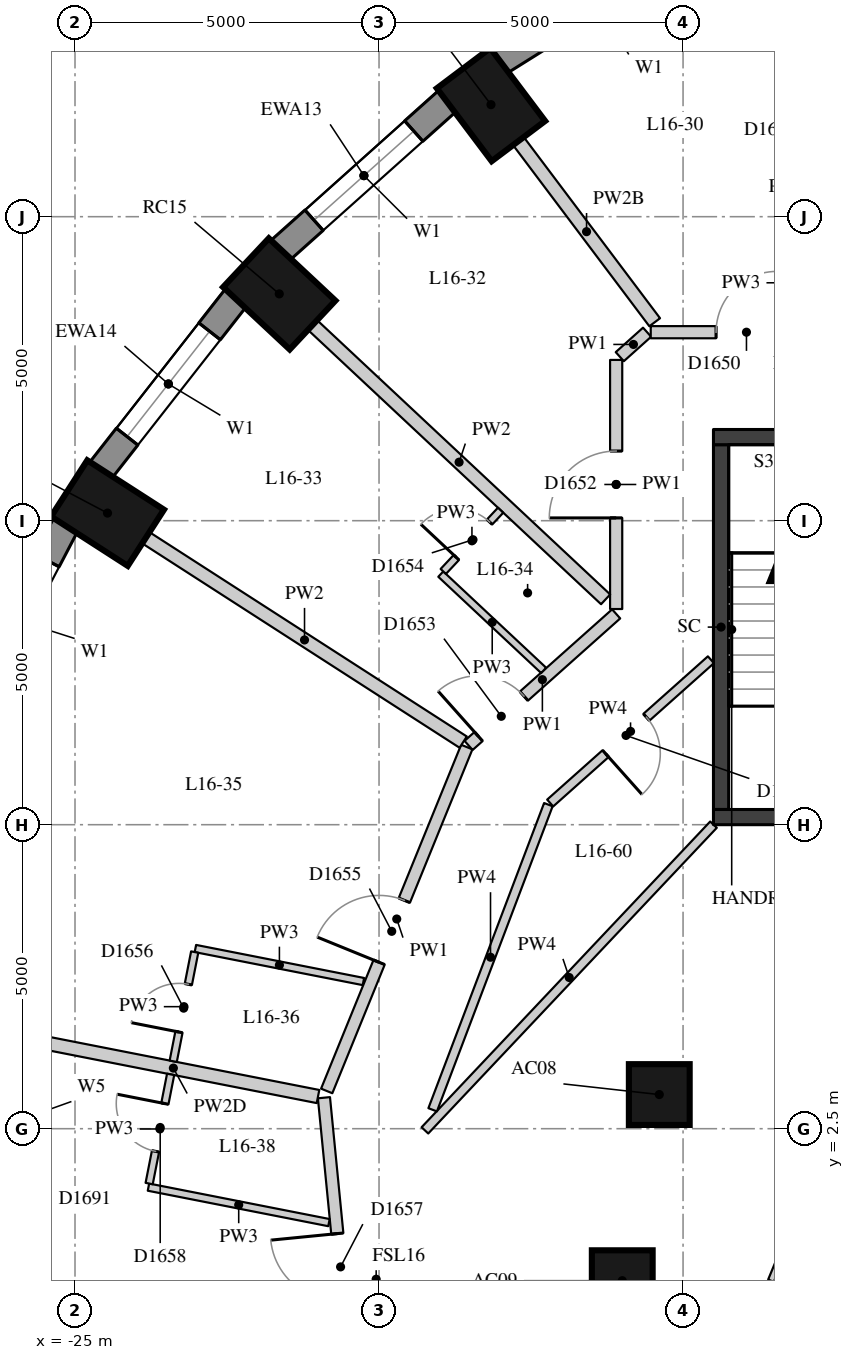
"""IFC4 building model, lengths in metres.
Left out: names, types, materials, properties, quantities, classifications, styles, units other than length and angle.
Written with IfcOpenShell. Run it as: python <this file> out.ifc"""

import sys

from ifc_helpers import new_model, si_unit, direction, frame, frame_2d, origin, origin_2d, place, context, subcontext, project, spatial, rectangle, extrude, element, fill, save


model = new_model("IFC4")
c1 = context("Model", 3, precision=1e-05, world=origin(), true_north=direction((0.0, 1.0)))
c2 = subcontext(c1, "Body", "Model", "MODEL_VIEW")
j1 = project(units=[si_unit("LENGTHUNIT", "METRE"), si_unit("PLANEANGLEUNIT", "RADIAN")], contexts=[c1])
p1 = place(None, origin())
s1 = spatial("IfcSite", under=j1, at=p1, CompositionType="ELEMENT")
p2 = place(p1, origin())
s2 = spatial("IfcBuilding", under=s1, at=p2, CompositionType="ELEMENT")
p3 = place(p2, frame((0.0, 0.0, 61.3)))
s3 = spatial("IfcBuildingStorey", under=s2, at=p3, CompositionType="ELEMENT", Elevation=61.3)
for number, where, z_axis, x_axis in (
    (1, (-18.159, 19.343, 0.0), (0.0, 0.0, 1.0), (-0.601, 0.799, 0.0)),
    (2, (-21.641, 16.23, 0.0), (0.0, 0.0, 1.0), (-0.73, 0.683, 0.0)),
    (3, (-24.465, 12.625, 0.0), (0.0, 0.0, 1.0), (-0.841, 0.541, 0.0)),
):
    element("IfcColumn", number, at=place(p3, frame(where, z_axis=z_axis, x_axis=x_axis)), inside=s3, PredefinedType="COLUMN", context=c2, shape_type="SweptSolid", body=[
        extrude(rectangle(XDim=1.5, YDim=1.1, at=origin_2d()), origin(), (0.0, 0.0, 1.0), 3.3),
    ])
for number, where, z_axis, x_axis in (
    (4, (-15.391, 3.062, 0.0), (0.0, 0.0, 1.0), (1.0, 0.0, 0.0)),
    (5, (-16.0, 0.0, 0.0), (0.0, 0.0, 1.0), (1.0, 0.0, 0.0)),
):
    element("IfcColumn", number, at=place(p3, frame(where, z_axis=z_axis, x_axis=x_axis)), inside=s3, PredefinedType="COLUMN", context=c2, shape_type="SweptSolid", body=[
        extrude(rectangle(XDim=1.0, YDim=1.0, at=origin_2d()), origin(), (0.0, 0.0, 1.0), 3.3),
    ])
p4 = place(p3, frame((-14.817, 22.051, 0.0), z_axis=(0.0, 0.0, 1.0), x_axis=(-0.847635480093, -0.530579016629, 0.0)))
e6 = element("IfcWall", 6, at=p4, inside=s3, PredefinedType="SOLIDWALL", context=c2, shape_type="SweptSolid", body=[
    extrude(rectangle(XDim=3.782, YDim=0.45, at=frame_2d((1.891, 0.0))), origin(), (0.0, 0.0, 1.0), 3.02),
])
p5 = place(p4, frame((0.791, 0.0, 0.4)))
e7 = element("IfcOpeningElement", 7, at=p5, cuts=e6, PredefinedType="OPENING", context=c2, shape_type="SweptSolid", body=[
    extrude(rectangle(XDim=2.2, YDim=1.75, at=frame_2d((1.1, 0.875))), frame((0.0, 0.235, 0.0), z_axis=(0.0, -1.0, 0.0), x_axis=(1.0, 0.0, 0.0)), (0.0, 0.0, 1.0), 0.47),
])
p6 = place(p3, frame((-18.871, 19.407, 0.0), z_axis=(0.0, 0.0, 1.0), x_axis=(-0.745526233716, -0.66647628228, 0.0)))
e8 = element("IfcWall", 8, at=p6, inside=s3, PredefinedType="SOLIDWALL", context=c2, shape_type="SweptSolid", body=[
    extrude(rectangle(XDim=3.697, YDim=0.45, at=frame_2d((1.848, 0.0))), origin(), (0.0, 0.0, 1.0), 3.02),
])
p7 = place(p6, frame((0.749, 0.0, 0.4)))
e9 = element("IfcOpeningElement", 9, at=p7, cuts=e8, PredefinedType="OPENING", context=c2, shape_type="SweptSolid", body=[
    extrude(rectangle(XDim=2.2, YDim=1.75, at=frame_2d((1.1, 0.875))), frame((0.0, 0.235, 0.0), z_axis=(0.0, -1.0, 0.0), x_axis=(1.0, 0.0, 0.0)), (0.0, 0.0, 1.0), 0.47),
])
p8 = place(p3, frame((-22.352, 16.17, 0.0), z_axis=(0.0, 0.0, 1.0), x_axis=(-0.616661975264, -0.787228053529, 0.0)))
e10 = element("IfcWall", 10, at=p8, inside=s3, PredefinedType="SOLIDWALL", context=c2, shape_type="SweptSolid", body=[
    extrude(rectangle(XDim=3.61, YDim=0.45, at=frame_2d((1.805, 0.0))), origin(), (0.0, 0.0, 1.0), 3.02),
])
p9 = place(p8, frame((0.705, 0.0, 0.4)))
e11 = element("IfcOpeningElement", 11, at=p9, cuts=e10, PredefinedType="OPENING", context=c2, shape_type="SweptSolid", body=[
    extrude(rectangle(XDim=2.2, YDim=1.75, at=frame_2d((1.1, 0.875))), frame((0.0, 0.235, 0.0), z_axis=(0.0, -1.0, 0.0), x_axis=(1.0, 0.0, 0.0)), (0.0, 0.0, 1.0), 0.47),
])
p10 = place(p3, frame((-25.152, 12.437, 0.0), z_axis=(0.0, 0.0, 1.0), x_axis=(-0.462492775226, -0.886623050041, 0.0)))
e12 = element("IfcWall", 12, at=p10, inside=s3, PredefinedType="SOLIDWALL", context=c2, shape_type="SweptSolid", body=[
    extrude(rectangle(XDim=3.532, YDim=0.45, at=frame_2d((1.766, 0.0))), origin(), (0.0, 0.0, 1.0), 3.02),
])
p11 = place(p10, frame((0.666, 0.0, 0.4)))
e13 = element("IfcOpeningElement", 13, at=p11, cuts=e12, PredefinedType="OPENING", context=c2, shape_type="SweptSolid", body=[
    extrude(rectangle(XDim=2.2, YDim=1.75, at=frame_2d((1.1, 0.875))), frame((0.0, 0.235, 0.0), z_axis=(0.0, -1.0, 0.0), x_axis=(1.0, 0.0, 0.0)), (0.0, 0.0, 1.0), 0.47),
])
p12 = place(p3, frame((-14.375, 7.75, -0.28), z_axis=(0.0, 0.0, 1.0), x_axis=(0.0, 1.0, 0.0)))
e14 = element("IfcWall", 14, at=p12, inside=s3, PredefinedType="SHEAR", context=c2, shape_type="SweptSolid", body=[
    extrude(rectangle(XDim=6.0, YDim=0.25, at=frame_2d((3.0, 0.0))), origin(), (0.0, 0.0, 1.0), 3.3),
])
for number, where, z_axis, x_axis in (
    (15, (-14.5, 13.875, -0.28), (0.0, 0.0, 1.0), (1.0, 0.0, 0.0)),
    (16, (-14.5, 7.625, -0.28), (0.0, 0.0, 1.0), (1.0, 0.0, 0.0)),
):
    element("IfcWall", number, at=place(p3, frame(where, z_axis=z_axis, x_axis=x_axis)), inside=s3, PredefinedType="SHEAR", context=c2, shape_type="SweptSolid", body=[
        extrude(rectangle(XDim=5.2, YDim=0.25, at=frame_2d((2.6, 0.0))), origin(), (0.0, 0.0, 1.0), 3.3),
    ])
p13 = place(p3, frame((-20.034, -5.858, 0.0), z_axis=(0.0, 0.0, 1.0), x_axis=(-0.097894942705, 0.995196754513, 0.0)))
e17 = element("IfcWall", 17, at=p13, inside=s3, PredefinedType="PARTITIONING", context=c2, shape_type="SweptSolid", body=[
    extrude(rectangle(XDim=8.911, YDim=0.2, at=frame_2d((4.455, 0.0))), origin(), (0.0, 0.0, 1.0), 3.02),
])
p14 = place(p13, frame((5.565, 0.0, 0.0)))
e18 = element("IfcOpeningElement", 18, at=p14, cuts=e17, PredefinedType="OPENING", context=c2, shape_type="SweptSolid", body=[
    extrude(rectangle(XDim=1.1, YDim=2.1, at=frame_2d((0.55, 1.05))), frame((0.0, 0.11, 0.0), z_axis=(0.0, -1.0, 0.0), x_axis=(1.0, 0.0, 0.0)), (0.0, 0.0, 1.0), 0.22),
])
p15 = place(p13, frame((1.044, 0.0, 0.0)))
e19 = element("IfcOpeningElement", 19, at=p15, cuts=e17, PredefinedType="OPENING", context=c2, shape_type="SweptSolid", body=[
    extrude(rectangle(XDim=0.9, YDim=2.1, at=frame_2d((0.45, 1.05))), frame((0.0, 0.11, 0.0), z_axis=(0.0, -1.0, 0.0), x_axis=(1.0, 0.0, 0.0)), (0.0, 0.0, 1.0), 0.22),
])
p16 = place(p3, frame((-20.861, 3.121, 0.0), z_axis=(0.0, 0.0, 1.0), x_axis=(0.377214346955, 0.926125983034, 0.0)))
e20 = element("IfcWall", 20, at=p16, inside=s3, PredefinedType="PARTITIONING", context=c2, shape_type="SweptSolid", body=[
    extrude(rectangle(XDim=6.107, YDim=0.2, at=frame_2d((3.054, 0.0))), origin(), (0.0, 0.0, 1.0), 3.02),
])
p17 = place(p16, frame((2.285, 0.0, 0.0)))
e21 = element("IfcOpeningElement", 21, at=p17, cuts=e20, PredefinedType="OPENING", context=c2, shape_type="SweptSolid", body=[
    extrude(rectangle(XDim=1.1, YDim=2.1, at=frame_2d((0.55, 1.05))), frame((0.0, 0.11, 0.0), z_axis=(0.0, -1.0, 0.0), x_axis=(1.0, 0.0, 0.0)), (0.0, 0.0, 1.0), 0.22),
])
p18 = place(p3, frame((-18.527, 8.804, 0.0), z_axis=(0.0, 0.0, 1.0), x_axis=(0.746493000154, 0.665393267716, 0.0)))
e22 = element("IfcWall", 22, at=p18, inside=s3, PredefinedType="PARTITIONING", context=c2, shape_type="SweptSolid", body=[
    extrude(rectangle(XDim=3.251, YDim=0.2, at=frame_2d((1.625, 0.0))), origin(), (0.0, 0.0, 1.0), 3.02),
])
p19 = place(p18, frame((0.22, 0.0, 0.0)))
e23 = element("IfcOpeningElement", 23, at=p19, cuts=e22, PredefinedType="OPENING", context=c2, shape_type="SweptSolid", body=[
    extrude(rectangle(XDim=1.0, YDim=2.1, at=frame_2d((0.5, 1.05))), frame((0.0, 0.11, 0.0), z_axis=(0.0, -1.0, 0.0), x_axis=(1.0, 0.0, 0.0)), (0.0, 0.0, 1.0), 0.22),
])
p20 = place(p3, frame((-16.1, 11.047, 0.0), z_axis=(0.0, 0.0, 1.0), x_axis=(0.0, 1.0, 0.0)))
e24 = element("IfcWall", 24, at=p20, inside=s3, PredefinedType="PARTITIONING", context=c2, shape_type="SweptSolid", body=[
    extrude(rectangle(XDim=4.097, YDim=0.2, at=frame_2d((2.048, 0.0))), origin(), (0.0, 0.0, 1.0), 3.02),
])
p21 = place(p20, frame((1.499, 0.0, 0.0)))
e25 = element("IfcOpeningElement", 25, at=p21, cuts=e24, PredefinedType="OPENING", context=c2, shape_type="SweptSolid", body=[
    extrude(rectangle(XDim=1.1, YDim=2.1, at=frame_2d((0.55, 1.05))), frame((0.0, 0.11, 0.0), z_axis=(0.0, -1.0, 0.0), x_axis=(1.0, 0.0, 0.0)), (0.0, 0.0, 1.0), 0.22),
])
p22 = place(p3, frame((-16.041, 15.198, 0.0), z_axis=(0.0, 0.0, 1.0), x_axis=(0.744722115519, 0.667374685359, 0.0)))
e26 = element("IfcWall", 26, at=p22, inside=s3, PredefinedType="PARTITIONING", context=c2, shape_type="SweptSolid", body=[
    extrude(rectangle(XDim=0.603, YDim=0.2, at=frame_2d((0.301, 0.0))), origin(), (0.0, 0.0, 1.0), 3.02),
])
p23 = place(p3, frame((-15.531, 15.6, 0.0), z_axis=(0.0, 0.0, 1.0), x_axis=(1.0, 0.0, 0.0)))
e27 = element("IfcWall", 27, at=p23, inside=s3, PredefinedType="PARTITIONING", context=c2, shape_type="SweptSolid", body=[
    extrude(rectangle(XDim=4.66, YDim=0.2, at=frame_2d((2.33, 0.0))), origin(), (0.0, 0.0, 1.0), 3.02),
])
p24 = place(p23, frame((1.074, 0.0, 0.0)))
e28 = element("IfcOpeningElement", 28, at=p24, cuts=e27, PredefinedType="OPENING", context=c2, shape_type="SweptSolid", body=[
    extrude(rectangle(XDim=1.0, YDim=2.1, at=frame_2d((0.5, 1.05))), frame((0.0, 0.11, 0.0), z_axis=(0.0, -1.0, 0.0), x_axis=(1.0, 0.0, 0.0)), (0.0, 0.0, 1.0), 0.22),
])
p25 = place(p3, frame((-14.499, 7.501, 0.0), z_axis=(0.0, 0.0, 1.0), x_axis=(-0.686403699782, -0.727220709913, 0.0)))
e29 = element("IfcWall", 29, at=p25, inside=s3, PredefinedType="PARTITIONING", context=c2, shape_type="SweptSolid", body=[
    extrude(rectangle(XDim=6.915, YDim=0.15, at=frame_2d((3.457, 0.0))), origin(), (0.0, 0.0, 1.0), 3.02),
])
p26 = place(p3, frame((-19.118, 2.811, 0.0), z_axis=(0.0, 0.0, 1.0), x_axis=(0.35451573991, 0.935050046872, 0.0)))
e30 = element("IfcWall", 30, at=p26, inside=s3, PredefinedType="PARTITIONING", context=c2, shape_type="SweptSolid", body=[
    extrude(rectangle(XDim=5.367, YDim=0.15, at=frame_2d((2.684, 0.0))), origin(), (0.0, 0.0, 1.0), 3.02),
])
p27 = place(p3, frame((-17.185, 7.856, 0.0), z_axis=(0.0, 0.0, 1.0), x_axis=(0.746480516634, 0.665407272493, 0.0)))
e31 = element("IfcWall", 31, at=p27, inside=s3, PredefinedType="PARTITIONING", context=c2, shape_type="SweptSolid", body=[
    extrude(rectangle(XDim=3.541, YDim=0.15, at=frame_2d((1.771, 0.0))), origin(), (0.0, 0.0, 1.0), 3.02),
])
p28 = place(p27, frame((1.221, 0.0, 0.0)))
e32 = element("IfcOpeningElement", 32, at=p28, cuts=e31, PredefinedType="OPENING", context=c2, shape_type="SweptSolid", body=[
    extrude(rectangle(XDim=0.9, YDim=2.1, at=frame_2d((0.45, 1.05))), frame((0.0, 0.085, 0.0), z_axis=(0.0, -1.0, 0.0), x_axis=(1.0, 0.0, 0.0)), (0.0, 0.0, 1.0), 0.17),
])
p29 = place(p3, frame((-13.78, 21.201, 0.0), z_axis=(0.0, 0.0, 1.0), x_axis=(0.459699000582, -0.888074787878, 0.0)))
e33 = element("IfcWall", 33, at=p29, inside=s3, PredefinedType="PARTITIONING", context=c2, shape_type="SweptSolid", body=[
    extrude(rectangle(XDim=6.134, YDim=0.22, at=frame_2d((3.067, 0.0))), origin(), (0.0, 0.0, 1.0), 3.02),
])
p30 = place(p3, frame((-17.708, 18.743, 0.0), z_axis=(0.0, 0.0, 1.0), x_axis=(0.601172757903, -0.799119086967, 0.0)))
e34 = element("IfcWall", 34, at=p30, inside=s3, PredefinedType="PARTITIONING", context=c2, shape_type="SweptSolid", body=[
    extrude(rectangle(XDim=3.729, YDim=0.22, at=frame_2d((1.864, 0.0))), origin(), (0.0, 0.0, 1.0), 2.57),
])
p31 = place(p3, frame((-21.093, 15.718, 0.0), z_axis=(0.0, 0.0, 1.0), x_axis=(0.73009284205, -0.683347965525, 0.0)))
e35 = element("IfcWall", 35, at=p31, inside=s3, PredefinedType="PARTITIONING", context=c2, shape_type="SweptSolid", body=[
    extrude(rectangle(XDim=6.602, YDim=0.22, at=frame_2d((3.301, 0.0))), origin(), (0.0, 0.0, 1.0), 3.02),
])
p32 = place(p3, frame((-23.835, 12.219, 0.0), z_axis=(0.0, 0.0, 1.0), x_axis=(0.840743714791, -0.541433288633, 0.0)))
e36 = element("IfcWall", 36, at=p32, inside=s3, PredefinedType="PARTITIONING", context=c2, shape_type="SweptSolid", body=[
    extrude(rectangle(XDim=6.207, YDim=0.22, at=frame_2d((3.104, 0.0))), origin(), (0.0, 0.0, 1.0), 3.02),
])
p33 = place(p3, frame((-25.761, 3.964, 0.0), z_axis=(0.0, 0.0, 1.0), x_axis=(0.981216494224, -0.192909801364, 0.0)))
e37 = element("IfcWall", 37, at=p33, inside=s3, PredefinedType="PARTITIONING", context=c2, shape_type="SweptSolid", body=[
    extrude(rectangle(XDim=4.848, YDim=0.22, at=frame_2d((2.424, 0.0))), origin(), (0.0, 0.0, 1.0), 2.47),
])
p34 = place(p3, frame((-17.293, 10.038, 0.0), z_axis=(0.0, 0.0, 1.0), x_axis=(-0.730059424734, 0.683383667026, 0.0)))
e38 = element("IfcWall", 38, at=p34, inside=s3, PredefinedType="PARTITIONING", context=c2, shape_type="SweptSolid", body=[
    extrude(rectangle(XDim=2.317, YDim=0.12, at=frame_2d((1.159, 0.0))), origin(), (0.0, 0.0, 1.0), 3.02),
])
p35 = place(p3, frame((-20.257, 4.92, 0.0), z_axis=(0.0, 0.0, 1.0), x_axis=(-0.981202530622, 0.192980812261, 0.0)))
e39 = element("IfcWall", 39, at=p35, inside=s3, PredefinedType="PARTITIONING", context=c2, shape_type="SweptSolid", body=[
    extrude(rectangle(XDim=2.816, YDim=0.12, at=frame_2d((1.408, 0.0))), origin(), (0.0, 0.0, 1.0), 3.02),
])
p36 = place(p3, frame((-20.823, 0.955, 0.0), z_axis=(0.0, 0.0, 1.0), x_axis=(-0.981208735185, 0.192949262754, 0.0)))
e40 = element("IfcWall", 40, at=p36, inside=s3, PredefinedType="PARTITIONING", context=c2, shape_type="SweptSolid", body=[
    extrude(rectangle(XDim=3.025, YDim=0.12, at=frame_2d((1.513, 0.0))), origin(), (0.0, 0.0, 1.0), 3.02),
])
p37 = place(p3, frame((-18.943, 11.665, 0.0), z_axis=(0.0, 0.0, 1.0), x_axis=(0.683364094355, 0.730077745549, 0.0)))
e41 = element("IfcWall", 41, at=p37, inside=s3, PredefinedType="PARTITIONING", context=c2, shape_type="SweptSolid", body=[
    extrude(rectangle(XDim=1.38, YDim=0.12, at=frame_2d((0.69, 0.0))), origin(), (0.0, 0.0, 1.0), 3.02),
])
p38 = place(p37, frame((0.315, 0.0, 0.0)))
e42 = element("IfcOpeningElement", 42, at=p38, cuts=e41, PredefinedType="OPENING", context=c2, shape_type="SweptSolid", body=[
    extrude(rectangle(XDim=0.8, YDim=2.1, at=frame_2d((0.4, 1.05))), frame((0.0, 0.07, 0.0), z_axis=(0.0, -1.0, 0.0), x_axis=(1.0, 0.0, 0.0)), (0.0, 0.0, 1.0), 0.14),
])
p39 = place(p3, frame((-23.032, 5.405, 0.0), z_axis=(0.0, 0.0, 1.0), x_axis=(-0.19288291118, -0.981221780524, 0.0)))
e43 = element("IfcWall", 43, at=p39, inside=s3, PredefinedType="PARTITIONING", context=c2, shape_type="SweptSolid", body=[
    extrude(rectangle(XDim=1.83, YDim=0.12, at=frame_2d((0.915, 0.0))), origin(), (0.0, 0.0, 1.0), 3.02),
])
p40 = place(p39, frame((0.54, 0.0, 0.0)))
e44 = element("IfcOpeningElement", 44, at=p40, cuts=e43, PredefinedType="OPENING", context=c2, shape_type="SweptSolid", body=[
    extrude(rectangle(XDim=0.8, YDim=2.1, at=frame_2d((0.4, 1.05))), frame((0.0, 0.07, 0.0), z_axis=(0.0, -1.0, 0.0), x_axis=(1.0, 0.0, 0.0)), (0.0, 0.0, 1.0), 0.14),
])
p41 = place(p3, frame((-23.781, 1.598, 0.0), z_axis=(0.0, 0.0, 1.0), x_axis=(0.193036598643, 0.981191557029, 0.0)))
e45 = element("IfcWall", 45, at=p41, inside=s3, PredefinedType="PARTITIONING", context=c2, shape_type="SweptSolid", body=[
    extrude(rectangle(XDim=1.83, YDim=0.12, at=frame_2d((0.915, 0.0))), origin(), (0.0, 0.0, 1.0), 3.02),
])
p42 = place(p41, frame((0.54, 0.0, 0.0)))
e46 = element("IfcOpeningElement", 46, at=p42, cuts=e45, PredefinedType="OPENING", context=c2, shape_type="SweptSolid", body=[
    extrude(rectangle(XDim=0.8, YDim=2.1, at=frame_2d((0.4, 1.05))), frame((0.0, 0.07, 0.0), z_axis=(0.0, -1.0, 0.0), x_axis=(1.0, 0.0, 0.0)), (0.0, 0.0, 1.0), 0.14),
])
for number, where, z_axis, x_axis in (
    (47, (-11.927, -3.927, 0.0), (0.0, 0.0, 1.0), (-0.383, 0.924, 0.0)),
    (48, (-13.554, 0.0, 0.0), (0.0, 0.0, 1.0), (0.383, 0.924, 0.0)),
):
    element("IfcWall", number, at=place(p3, frame(where, z_axis=z_axis, x_axis=x_axis)), inside=s3, PredefinedType="PARTITIONING", context=c2, shape_type="SweptSolid", body=[
        extrude(rectangle(XDim=4.251, YDim=0.1, at=frame_2d((2.125, 0.0))), origin(), (0.0, 0.0, 1.0), 3.02),
    ])
p43 = place(p7, origin())
e49 = element("IfcWindow", 49, at=p43, inside=s3, PartitioningType="SINGLE_PANEL", PredefinedType="WINDOW", context=c2, shape_type="SweptSolid", body=[
    extrude(rectangle(XDim=2.2, YDim=1.75, at=frame_2d((1.1, 0.875))), frame((0.0, 0.035, 0.0), z_axis=(0.0, -1.0, 0.0), x_axis=(1.0, 0.0, 0.0)), (0.0, 0.0, 1.0), 0.06),
])
fill(e9, e49)
p44 = place(p9, origin())
e50 = element("IfcWindow", 50, at=p44, inside=s3, PartitioningType="SINGLE_PANEL", PredefinedType="WINDOW", context=c2, shape_type="SweptSolid", body=[
    extrude(rectangle(XDim=2.2, YDim=1.75, at=frame_2d((1.1, 0.875))), frame((0.0, 0.035, 0.0), z_axis=(0.0, -1.0, 0.0), x_axis=(1.0, 0.0, 0.0)), (0.0, 0.0, 1.0), 0.06),
])
fill(e11, e50)
p45 = place(p24, origin())
e51 = element("IfcDoor", 51, at=p45, inside=s3, OperationType="SINGLE_SWING_RIGHT", PredefinedType="DOOR", context=c2, shape_type="SweptSolid", body=[
    extrude(rectangle(XDim=1.0, YDim=2.1, at=frame_2d((0.5, 1.05))), frame((0.0, 0.025, 0.0), z_axis=(0.0, -1.0, 0.0), x_axis=(1.0, 0.0, 0.0)), (0.0, 0.0, 1.0), 0.05),
])
fill(e28, e51)
p46 = place(p21, origin())
e52 = element("IfcDoor", 52, at=p46, inside=s3, OperationType="SINGLE_SWING_LEFT", PredefinedType="DOOR", context=c2, shape_type="SweptSolid", body=[
    extrude(rectangle(XDim=1.1, YDim=2.1, at=frame_2d((0.55, 1.05))), frame((0.0, 0.025, 0.0), z_axis=(0.0, -1.0, 0.0), x_axis=(1.0, 0.0, 0.0)), (0.0, 0.0, 1.0), 0.05),
])
fill(e25, e52)
p47 = place(p19, origin())
e53 = element("IfcDoor", 53, at=p47, inside=s3, OperationType="SINGLE_SWING_LEFT", PredefinedType="DOOR", context=c2, shape_type="SweptSolid", body=[
    extrude(rectangle(XDim=1.0, YDim=2.1, at=frame_2d((0.5, 1.05))), frame((0.0, 0.025, 0.0), z_axis=(0.0, -1.0, 0.0), x_axis=(1.0, 0.0, 0.0)), (0.0, 0.0, 1.0), 0.05),
])
fill(e23, e53)
p48 = place(p38, origin())
e54 = element("IfcDoor", 54, at=p48, inside=s3, OperationType="SINGLE_SWING_LEFT", PredefinedType="DOOR", context=c2, shape_type="SweptSolid", body=[
    extrude(rectangle(XDim=0.8, YDim=2.1, at=frame_2d((0.4, 1.05))), frame((0.0, 0.025, 0.0), z_axis=(0.0, -1.0, 0.0), x_axis=(1.0, 0.0, 0.0)), (0.0, 0.0, 1.0), 0.05),
])
fill(e42, e54)
p49 = place(p17, origin())
e55 = element("IfcDoor", 55, at=p49, inside=s3, OperationType="SINGLE_SWING_LEFT", PredefinedType="DOOR", context=c2, shape_type="SweptSolid", body=[
    extrude(rectangle(XDim=1.1, YDim=2.1, at=frame_2d((0.55, 1.05))), frame((0.0, 0.025, 0.0), z_axis=(0.0, -1.0, 0.0), x_axis=(1.0, 0.0, 0.0)), (0.0, 0.0, 1.0), 0.05),
])
fill(e21, e55)
p50 = place(p40, origin())
e56 = element("IfcDoor", 56, at=p50, inside=s3, OperationType="SINGLE_SWING_LEFT", PredefinedType="DOOR", context=c2, shape_type="SweptSolid", body=[
    extrude(rectangle(XDim=0.8, YDim=2.1, at=frame_2d((0.4, 1.05))), frame((0.0, 0.025, 0.0), z_axis=(0.0, -1.0, 0.0), x_axis=(1.0, 0.0, 0.0)), (0.0, 0.0, 1.0), 0.05),
])
fill(e44, e56)
p51 = place(p14, origin())
e57 = element("IfcDoor", 57, at=p51, inside=s3, OperationType="SINGLE_SWING_RIGHT", PredefinedType="DOOR", context=c2, shape_type="SweptSolid", body=[
    extrude(rectangle(XDim=1.1, YDim=2.1, at=frame_2d((0.55, 1.05))), frame((0.0, 0.025, 0.0), z_axis=(0.0, -1.0, 0.0), x_axis=(1.0, 0.0, 0.0)), (0.0, 0.0, 1.0), 0.05),
])
fill(e18, e57)
p52 = place(p42, origin())
e58 = element("IfcDoor", 58, at=p52, inside=s3, OperationType="SINGLE_SWING_RIGHT", PredefinedType="DOOR", context=c2, shape_type="SweptSolid", body=[
    extrude(rectangle(XDim=0.8, YDim=2.1, at=frame_2d((0.4, 1.05))), frame((0.0, 0.025, 0.0), z_axis=(0.0, -1.0, 0.0), x_axis=(1.0, 0.0, 0.0)), (0.0, 0.0, 1.0), 0.05),
])
fill(e46, e58)
p53 = place(p28, origin())
e59 = element("IfcDoor", 59, at=p53, inside=s3, OperationType="SINGLE_SWING_RIGHT", PredefinedType="DOOR", context=c2, shape_type="SweptSolid", body=[
    extrude(rectangle(XDim=0.9, YDim=2.1, at=frame_2d((0.45, 1.05))), frame((0.0, 0.025, 0.0), z_axis=(0.0, -1.0, 0.0), x_axis=(1.0, 0.0, 0.0)), (0.0, 0.0, 1.0), 0.05),
])
fill(e32, e59)
save(model, sys.argv[1])
